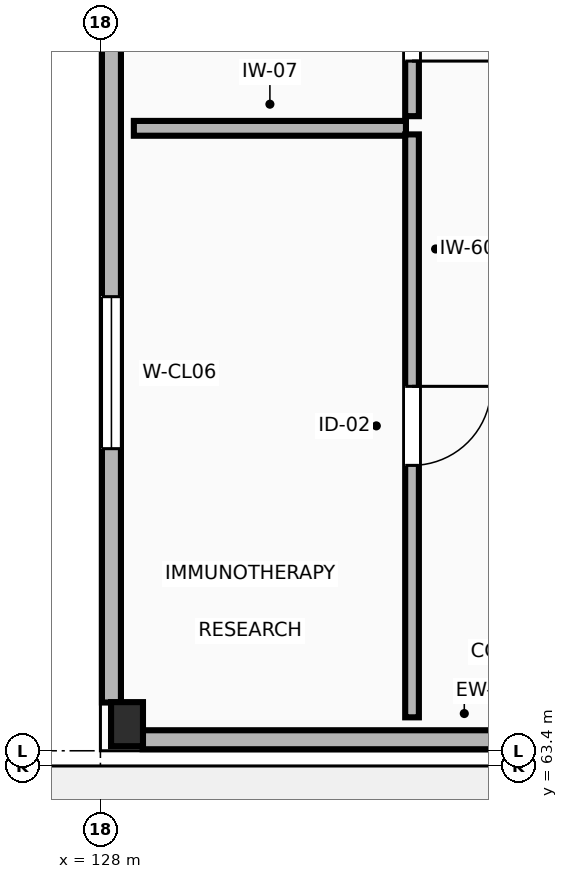
"""IFC4 building model, lengths in metres.
Left out: names, types, materials, properties, quantities, classifications, styles, units other than length and angle.
Written with IfcOpenShell. Run it as: python <this file> out.ifc"""

import sys

from ifc_helpers import new_model, si_unit, direction, frame, frame_2d, origin, origin_2d, place, context, subcontext, project, spatial, rectangle, extrude, element, fill, save


model = new_model("IFC4")
c1 = context("Model", 3, precision=1e-05, world=origin(), true_north=direction((0.0, 1.0)))
c2 = subcontext(c1, "Body", "Model", "MODEL_VIEW")
j1 = project(units=[si_unit("LENGTHUNIT", "METRE"), si_unit("PLANEANGLEUNIT", "RADIAN")], contexts=[c1])
p1 = place(None, origin())
s1 = spatial("IfcSite", under=j1, at=p1, CompositionType="ELEMENT")
p2 = place(p1, origin())
s2 = spatial("IfcBuilding", under=s1, at=p2, CompositionType="ELEMENT")
p3 = place(p2, frame((0.0, 0.0, 9.6)))
s3 = spatial("IfcBuildingStorey", under=s2, at=p3, CompositionType="ELEMENT", Elevation=9.6)
p4 = place(p3, frame((128.35, 63.95, 0.0), z_axis=(0.0, 0.0, 1.0), x_axis=(1.0, 0.0, 0.0)))
e1 = element("IfcColumn", 1, at=p4, inside=s3, PredefinedType="COLUMN", context=c2, shape_type="SweptSolid", body=[
    extrude(rectangle(XDim=0.42, YDim=0.58, at=origin_2d()), origin(), (0.0, 0.0, 1.0), 4.2),
])
p5 = place(p3, frame((128.555, 63.745, 0.0), z_axis=(0.0, 0.0, 1.0), x_axis=(1.0, 0.0, 0.0)))
e2 = element("IfcWall", 2, at=p5, inside=s3, PredefinedType="STANDARD", context=c2, shape_type="SweptSolid", body=[
    extrude(rectangle(XDim=8.465, YDim=0.25, at=frame_2d((4.232, 0.0))), origin(), (0.0, 0.0, 1.0), 3.22),
])
p6 = place(p3, frame((128.145, 72.915, 0.0), z_axis=(0.0, 0.0, 1.0), x_axis=(0.0, -1.0, 0.0)))
e3 = element("IfcWall", 3, at=p6, inside=s3, PredefinedType="STANDARD", context=c2, shape_type="SweptSolid", body=[
    extrude(rectangle(XDim=8.68, YDim=0.25, at=frame_2d((4.34, 0.0))), origin(), (0.0, 0.0, 1.0), 3.27),
])
p7 = place(p6, frame((3.34, 0.0, 0.95)))
e4 = element("IfcOpeningElement", 4, at=p7, cuts=e3, PredefinedType="OPENING", context=c2, shape_type="SweptSolid", body=[
    extrude(rectangle(XDim=2.0, YDim=1.6, at=frame_2d((1.0, 0.8))), frame((0.0, 0.135, 0.0), z_axis=(0.0, -1.0, 0.0), x_axis=(1.0, 0.0, 0.0)), (0.0, 0.0, 1.0), 0.27),
])
p8 = place(p3, frame((128.44, 71.79, 0.0), z_axis=(0.0, 0.0, 1.0), x_axis=(1.0, 0.0, 0.0)))
e5 = element("IfcWall", 5, at=p8, inside=s3, PredefinedType="PARTITIONING", context=c2, shape_type="SweptSolid", body=[
    extrude(rectangle(XDim=3.58, YDim=0.195, at=frame_2d((1.79, 0.0))), origin(), (0.0, 0.0, 1.0), 3.92),
])
p9 = place(p3, frame((132.1, 71.71, 0.0), z_axis=(0.0, 0.0, 1.0), x_axis=(0.0, -1.0, 0.0)))
e6 = element("IfcWall", 6, at=p9, inside=s3, PredefinedType="PARTITIONING", context=c2, shape_type="SweptSolid", body=[
    extrude(rectangle(XDim=7.67, YDim=0.18, at=frame_2d((3.835, 0.0))), origin(), (0.0, 0.0, 1.0), 3.92),
])
p10 = place(p9, frame((3.315, 0.0, 0.0)))
e7 = element("IfcOpeningElement", 7, at=p10, cuts=e6, PredefinedType="OPENING", context=c2, shape_type="SweptSolid", body=[
    extrude(rectangle(XDim=1.04, YDim=2.15, at=frame_2d((0.52, 1.075))), frame((0.0, 0.1, 0.0), z_axis=(0.0, -1.0, 0.0), x_axis=(1.0, 0.0, 0.0)), (0.0, 0.0, 1.0), 0.2),
])
p11 = place(p3, frame((132.1, 74.75, 0.0), z_axis=(0.0, 0.0, 1.0), x_axis=(0.0, -1.0, 0.0)))
e8 = element("IfcWall", 8, at=p11, inside=s3, PredefinedType="PARTITIONING", context=c2, shape_type="SweptSolid", body=[
    extrude(rectangle(XDim=2.8, YDim=0.18, at=frame_2d((1.4, 0.0))), origin(), (0.0, 0.0, 1.0), 3.92),
])
p12 = place(p11, frame((0.725, 0.0, 0.0)))
e9 = element("IfcOpeningElement", 9, at=p12, cuts=e8, PredefinedType="OPENING", context=c2, shape_type="SweptSolid", body=[
    extrude(rectangle(XDim=1.35, YDim=2.2, at=frame_2d((0.675, 1.1))), frame((0.0, 0.1, 0.0), z_axis=(0.0, -1.0, 0.0), x_axis=(1.0, 0.0, 0.0)), (0.0, 0.0, 1.0), 0.2),
])
p13 = place(p7, origin())
e10 = element("IfcWindow", 10, at=p13, inside=s3, PartitioningType="SINGLE_PANEL", PredefinedType="WINDOW", context=c2, shape_type="SweptSolid", body=[
    extrude(rectangle(XDim=2.0, YDim=1.6, at=frame_2d((1.0, 0.8))), frame((0.0, 0.03, 0.0), z_axis=(0.0, -1.0, 0.0), x_axis=(1.0, 0.0, 0.0)), (0.0, 0.0, 1.0), 0.06),
])
fill(e4, e10)
p14 = place(p10, origin())
e11 = element("IfcDoor", 11, at=p14, inside=s3, OperationType="SINGLE_SWING_LEFT", PredefinedType="DOOR", context=c2, shape_type="SweptSolid", body=[
    extrude(rectangle(XDim=1.04, YDim=2.15, at=frame_2d((0.52, 1.075))), frame((0.0, 0.025, 0.0), z_axis=(0.0, -1.0, 0.0), x_axis=(1.0, 0.0, 0.0)), (0.0, 0.0, 1.0), 0.05),
])
fill(e7, e11)
p15 = place(p12, origin())
e12 = element("IfcDoor", 12, at=p15, inside=s3, OperationType="SINGLE_SWING_RIGHT", PredefinedType="DOOR", context=c2, shape_type="SweptSolid", body=[
    extrude(rectangle(XDim=1.35, YDim=2.2, at=frame_2d((0.675, 1.1))), frame((0.0, 0.025, 0.0), z_axis=(0.0, -1.0, 0.0), x_axis=(1.0, 0.0, 0.0)), (0.0, 0.0, 1.0), 0.05),
])
fill(e9, e12)
save(model, sys.argv[1])
